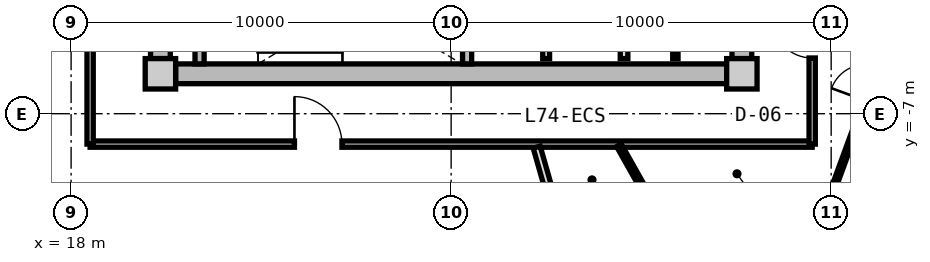
"""IFC4 building model, lengths in metres.
Left out: names, types, materials, properties, quantities, classifications, styles, units other than length and angle.
Written with IfcOpenShell. Run it as: python <this file> out.ifc"""

import sys

from ifc_helpers import new_model, si_unit, direction, frame, frame_2d, origin, origin_2d, place, context, subcontext, project, spatial, rectangle, extrude, source, transform, mapped, element, fill, save


model = new_model("IFC4")
c1 = context("Model", 3, precision=1e-05, world=origin(), true_north=direction((0.0, 1.0)))
c2 = subcontext(c1, "Body", "Model", "MODEL_VIEW")
j1 = project(units=[si_unit("LENGTHUNIT", "METRE"), si_unit("PLANEANGLEUNIT", "RADIAN")], contexts=[c1])
p1 = place(None, origin())
s1 = spatial("IfcSite", under=j1, at=p1, CompositionType="ELEMENT")
p2 = place(p1, origin())
s2 = spatial("IfcBuilding", under=s1, at=p2, CompositionType="ELEMENT")
p3 = place(p2, frame((0.0, 0.0, 238.3)))
s3 = spatial("IfcBuildingStorey", under=s2, at=p3, CompositionType="ELEMENT", Elevation=238.3)
m1 = source(origin(), c2, "Body", "SweptSolid", [
    extrude(rectangle(XDim=0.8, YDim=0.8, at=origin_2d()), origin(), (0.0, 0.0, 1.0), 3.05),
])
for number, where, z_axis, x_axis in (
    (1, (20.35, -5.95, 0.0), (0.0, 0.0, 1.0), (1.0, 0.0, 0.0)),
    (2, (35.65, -5.95, 0.0), (0.0, 0.0, 1.0), (1.0, 0.0, 0.0)),
):
    element("IfcColumn", number, at=place(p3, frame(where, z_axis=z_axis, x_axis=x_axis)), inside=s3, PredefinedType="COLUMN", context=c2, shape_type="MappedRepresentation", body=[
        mapped(m1, transform((0.0, 0.0, 0.0), x_axis=(1.0, 0.0, 0.0), y_axis=(0.0, 1.0, 0.0), z_axis=(0.0, 0.0, 1.0), scale=1.0)),
    ])
m2 = source(origin(), c2, "Body", "SweptSolid", [
    extrude(rectangle(XDim=14.5, YDim=0.52, at=frame_2d((7.25, 0.0))), origin(), (0.0, 0.0, 1.0), 2.81),
])
p4 = place(p3, frame((35.25, -5.95, 0.0), z_axis=(0.0, 0.0, 1.0), x_axis=(-1.0, 0.0, 0.0)))
e3 = element("IfcWall", 3, at=p4, inside=s3, PredefinedType="SHEAR", context=c2, shape_type="MappedRepresentation", body=[
    mapped(m2, transform((0.0, 0.0, 0.0), x_axis=(1.0, 0.0, 0.0), y_axis=(0.0, 1.0, 0.0), z_axis=(0.0, 0.0, 1.0), scale=1.0)),
])
m3 = source(origin(), c2, "Body", "SweptSolid", [
    extrude(rectangle(XDim=11.1, YDim=0.52, at=frame_2d((5.55, 0.0))), origin(), (0.0, 0.0, 1.0), 2.81),
])
p5 = place(p3, frame((20.35, -5.55, 0.0), z_axis=(0.0, 0.0, 1.0), x_axis=(0.0, 1.0, 0.0)))
e4 = element("IfcWall", 4, at=p5, inside=s3, PredefinedType="SHEAR", context=c2, shape_type="MappedRepresentation", body=[
    mapped(m3, transform((0.0, 0.0, 0.0), x_axis=(1.0, 0.0, 0.0), y_axis=(0.0, 1.0, 0.0), z_axis=(0.0, 0.0, 1.0), scale=1.0)),
])
p6 = place(p5, frame((3.8, 0.0, 0.0)))
e5 = element("IfcOpeningElement", 5, at=p6, cuts=e4, PredefinedType="OPENING", context=c2, shape_type="SweptSolid", body=[
    extrude(rectangle(XDim=1.2, YDim=2.15, at=frame_2d((0.6, 1.075))), frame((0.0, 0.27, 0.0), z_axis=(0.0, -1.0, 0.0), x_axis=(1.0, 0.0, 0.0)), (0.0, 0.0, 1.0), 0.54),
])
p7 = place(p3, frame((35.65, 5.55, 0.0), z_axis=(0.0, 0.0, 1.0), x_axis=(0.0, -1.0, 0.0)))
e6 = element("IfcWall", 6, at=p7, inside=s3, PredefinedType="SHEAR", context=c2, shape_type="MappedRepresentation", body=[
    mapped(m3, transform((0.0, 0.0, 0.0), x_axis=(1.0, 0.0, 0.0), y_axis=(0.0, 1.0, 0.0), z_axis=(0.0, 0.0, 1.0), scale=1.0)),
])
p8 = place(p7, frame((5.65, 0.0, 0.0)))
e7 = element("IfcOpeningElement", 7, at=p8, cuts=e6, PredefinedType="OPENING", context=c2, shape_type="SweptSolid", body=[
    extrude(rectangle(XDim=1.2, YDim=2.15, at=frame_2d((0.6, 1.075))), frame((0.0, 0.27, 0.0), z_axis=(0.0, -1.0, 0.0), x_axis=(1.0, 0.0, 0.0)), (0.0, 0.0, 1.0), 0.54),
])
m4 = source(origin(), c2, "Body", "SweptSolid", [
    extrude(rectangle(XDim=3.24, YDim=0.24, at=frame_2d((1.62, 0.0))), origin(), (0.0, 0.0, 1.0), 2.81),
])
for number, where, z_axis, x_axis in (
    (8, (21.38, -5.69, 0.0), (0.0, 0.0, 1.0), (0.0, 1.0, 0.0)),
    (9, (28.42, -5.69, 0.0), (0.0, 0.0, 1.0), (0.0, 1.0, 0.0)),
):
    element("IfcWall", number, at=place(p3, frame(where, z_axis=z_axis, x_axis=x_axis)), inside=s3, PredefinedType="PARTITIONING", context=c2, shape_type="MappedRepresentation", body=[
        mapped(m4, transform((0.0, 0.0, 0.0), x_axis=(1.0, 0.0, 0.0), y_axis=(0.0, 1.0, 0.0), z_axis=(0.0, 0.0, 1.0), scale=1.0)),
    ])
m5 = source(origin(), c2, "Body", "SweptSolid", [
    extrude(rectangle(XDim=3.8, YDim=0.2, at=frame_2d((1.9, 0.0))), origin(), (0.0, 0.0, 1.0), 2.795),
])
p9 = place(p3, frame((32.55, -5.55, 0.0), z_axis=(0.0, 0.0, 1.0), x_axis=(0.0, 1.0, 0.0)))
e10 = element("IfcWall", 10, at=p9, inside=s3, PredefinedType="PARTITIONING", context=c2, shape_type="MappedRepresentation", body=[
    mapped(m5, transform((0.0, 0.0, 0.0), x_axis=(1.0, 0.0, 0.0), y_axis=(0.0, 1.0, 0.0), z_axis=(0.0, 0.0, 1.0), scale=1.0)),
])
m6 = source(origin(), c2, "Body", "SweptSolid", [
    extrude(rectangle(XDim=4.2, YDim=0.18, at=frame_2d((2.1, 0.0))), origin(), (0.0, 0.0, 1.0), 2.795),
])
p10 = place(p3, frame((30.5, -5.55, 0.0), z_axis=(0.0, 0.0, 1.0), x_axis=(0.0, 1.0, 0.0)))
e11 = element("IfcWall", 11, at=p10, inside=s3, PredefinedType="PARTITIONING", context=c2, shape_type="MappedRepresentation", body=[
    mapped(m6, transform((0.0, 0.0, 0.0), x_axis=(1.0, 0.0, 0.0), y_axis=(0.0, 1.0, 0.0), z_axis=(0.0, 0.0, 1.0), scale=1.0)),
])
m7 = source(origin(), c2, "Body", "SweptSolid", [
    extrude(rectangle(XDim=3.8, YDim=0.14, at=frame_2d((1.9, 0.0))), origin(), (0.0, 0.0, 1.0), 2.795),
])
p11 = place(p3, frame((33.9, -5.55, 0.0), z_axis=(0.0, 0.0, 1.0), x_axis=(0.0, 1.0, 0.0)))
e12 = element("IfcWall", 12, at=p11, inside=s3, PredefinedType="PARTITIONING", context=c2, shape_type="MappedRepresentation", body=[
    mapped(m7, transform((0.0, 0.0, 0.0), x_axis=(1.0, 0.0, 0.0), y_axis=(0.0, 1.0, 0.0), z_axis=(0.0, 0.0, 1.0), scale=1.0)),
])
m8 = source(origin(), c2, "Body", "SweptSolid", [
    extrude(rectangle(XDim=19.0, YDim=0.165, at=frame_2d((9.5, 0.0))), origin(), (0.0, 0.0, 1.0), 2.795),
])
p12 = place(p3, frame((37.5, -7.8, 0.0), z_axis=(0.0, 0.0, 1.0), x_axis=(-1.0, 0.0, 0.0)))
e13 = element("IfcWall", 13, at=p12, inside=s3, PredefinedType="PARTITIONING", context=c2, shape_type="MappedRepresentation", body=[
    mapped(m8, transform((0.0, 0.0, 0.0), x_axis=(1.0, 0.0, 0.0), y_axis=(0.0, 1.0, 0.0), z_axis=(0.0, 0.0, 1.0), scale=1.0)),
])
p13 = place(p12, frame((12.373, 0.0, 0.0)))
e14 = element("IfcOpeningElement", 14, at=p13, cuts=e13, PredefinedType="OPENING", context=c2, shape_type="SweptSolid", body=[
    extrude(rectangle(XDim=1.25, YDim=2.2, at=frame_2d((0.625, 1.1))), frame((0.0, 0.093, 0.0), z_axis=(0.0, -1.0, 0.0), x_axis=(1.0, 0.0, 0.0)), (0.0, 0.0, 1.0), 0.185),
])
m9 = source(origin(), c2, "Body", "SweptSolid", [
    extrude(rectangle(XDim=6.88, YDim=0.165, at=frame_2d((3.44, 0.0))), origin(), (0.0, 0.0, 1.0), 2.795),
])
p14 = place(p3, frame((18.5, -7.8, 0.0), z_axis=(0.0, 0.0, 1.0), x_axis=(0.0, 1.0, 0.0)))
e15 = element("IfcWall", 15, at=p14, inside=s3, PredefinedType="PARTITIONING", context=c2, shape_type="MappedRepresentation", body=[
    mapped(m9, transform((0.0, 0.0, 0.0), x_axis=(1.0, 0.0, 0.0), y_axis=(0.0, 1.0, 0.0), z_axis=(0.0, 0.0, 1.0), scale=1.0)),
])
p15 = place(p3, frame((37.5, -0.92, 0.0), z_axis=(0.0, 0.0, 1.0), x_axis=(0.0, -1.0, 0.0)))
e16 = element("IfcWall", 16, at=p15, inside=s3, PredefinedType="PARTITIONING", context=c2, shape_type="MappedRepresentation", body=[
    mapped(m9, transform((0.0, 0.0, 0.0), x_axis=(1.0, 0.0, 0.0), y_axis=(0.0, 1.0, 0.0), z_axis=(0.0, 0.0, 1.0), scale=1.0)),
])
p16 = place(p15, frame((3.564, 0.0, 0.0)))
e17 = element("IfcOpeningElement", 17, at=p16, cuts=e16, PredefinedType="OPENING", context=c2, shape_type="SweptSolid", body=[
    extrude(rectangle(XDim=1.05, YDim=2.15, at=frame_2d((0.525, 1.075))), frame((0.0, 0.093, 0.0), z_axis=(0.0, -1.0, 0.0), x_axis=(1.0, 0.0, 0.0)), (0.0, 0.0, 1.0), 0.185),
])
m10 = source(origin(), c2, "Body", "SweptSolid", [
    extrude(rectangle(XDim=6.974, YDim=0.19, at=frame_2d((3.487, 0.0))), origin(), (0.0, 0.0, 1.0), 2.395),
])
p17 = place(p3, frame((30.251, -7.88, 0.0), z_axis=(0.0, 0.0, 1.0), x_axis=(0.274707256801, -0.961527910703, 0.0)))
e18 = element("IfcWall", 18, at=p17, inside=s3, PredefinedType="PARTITIONING", context=c2, shape_type="MappedRepresentation", body=[
    mapped(m10, transform((0.0, 0.0, 0.0), x_axis=(1.0, 0.0, 0.0), y_axis=(0.0, 1.0, 0.0), z_axis=(0.0, 0.0, 1.0), scale=1.0)),
])
m11 = source(origin(), c2, "Body", "SweptSolid", [
    extrude(rectangle(XDim=6.69, YDim=0.115, at=frame_2d((3.345, 0.0))), origin(), (0.0, 0.0, 1.0), 2.795),
])
p18 = place(p3, frame((37.917, -9.352, 0.0), z_axis=(0.0, 0.0, 1.0), x_axis=(0.343693784919, 0.939081776102, 0.0)))
e19 = element("IfcWall", 19, at=p18, inside=s3, PredefinedType="PARTITIONING", context=c2, shape_type="MappedRepresentation", body=[
    mapped(m11, transform((0.0, 0.0, 0.0), x_axis=(1.0, 0.0, 0.0), y_axis=(0.0, 1.0, 0.0), z_axis=(0.0, 0.0, 1.0), scale=1.0)),
])
p19 = place(p18, frame((2.87, 0.0, 0.0)))
e20 = element("IfcOpeningElement", 20, at=p19, cuts=e19, PredefinedType="OPENING", context=c2, shape_type="SweptSolid", body=[
    extrude(rectangle(XDim=0.95, YDim=2.1, at=frame_2d((0.475, 1.05))), frame((0.0, 0.067, 0.0), z_axis=(0.0, -1.0, 0.0), x_axis=(1.0, 0.0, 0.0)), (0.0, 0.0, 1.0), 0.135),
])
m12 = source(origin(), c2, "Body", "SweptSolid", [
    extrude(rectangle(XDim=2.035, YDim=0.14, at=frame_2d((1.018, 0.0))), origin(), (0.0, 0.0, 1.0), 2.795),
])
p20 = place(p3, frame((32.415, -7.83, 0.0), z_axis=(0.0, 0.0, 1.0), x_axis=(0.491092509169, -0.871107425888, 0.0)))
e21 = element("IfcWall", 21, at=p20, inside=s3, PredefinedType="PARTITIONING", context=c2, shape_type="MappedRepresentation", body=[
    mapped(m12, transform((0.0, 0.0, 0.0), x_axis=(1.0, 0.0, 0.0), y_axis=(0.0, 1.0, 0.0), z_axis=(0.0, 0.0, 1.0), scale=1.0)),
])
m13 = source(origin(), c2, "Body", "SweptSolid", [
    extrude(rectangle(XDim=1.25, YDim=2.2, at=frame_2d((0.625, 1.1))), frame((0.0, 0.025, 0.0), z_axis=(0.0, -1.0, 0.0), x_axis=(1.0, 0.0, 0.0)), (0.0, 0.0, 1.0), 0.05),
])
p21 = place(p13, frame((1.25, 0.0, 0.0), z_axis=(0.0, 0.0, 1.0), x_axis=(-1.0, 0.0, 0.0)))
e22 = element("IfcDoor", 22, at=p21, inside=s3, OperationType="SINGLE_SWING_LEFT", PredefinedType="DOOR", context=c2, shape_type="MappedRepresentation", body=[
    mapped(m13, transform((0.0, 0.0, 0.0), x_axis=(1.0, 0.0, 0.0), y_axis=(0.0, 1.0, 0.0), z_axis=(0.0, 0.0, 1.0), scale=1.0)),
])
fill(e14, e22)
m14 = source(origin(), c2, "Body", "SweptSolid", [
    extrude(rectangle(XDim=1.05, YDim=2.15, at=frame_2d((0.525, 1.075))), frame((0.0, 0.025, 0.0), z_axis=(0.0, -1.0, 0.0), x_axis=(1.0, 0.0, 0.0)), (0.0, 0.0, 1.0), 0.05),
])
p22 = place(p16, frame((1.05, 0.0, 0.0), z_axis=(0.0, 0.0, 1.0), x_axis=(-1.0, 0.0, 0.0)))
e23 = element("IfcDoor", 23, at=p22, inside=s3, OperationType="SINGLE_SWING_RIGHT", PredefinedType="DOOR", context=c2, shape_type="MappedRepresentation", body=[
    mapped(m14, transform((0.0, 0.0, 0.0), x_axis=(1.0, 0.0, 0.0), y_axis=(0.0, 1.0, 0.0), z_axis=(0.0, 0.0, 1.0), scale=1.0)),
])
fill(e17, e23)
save(model, sys.argv[1])
